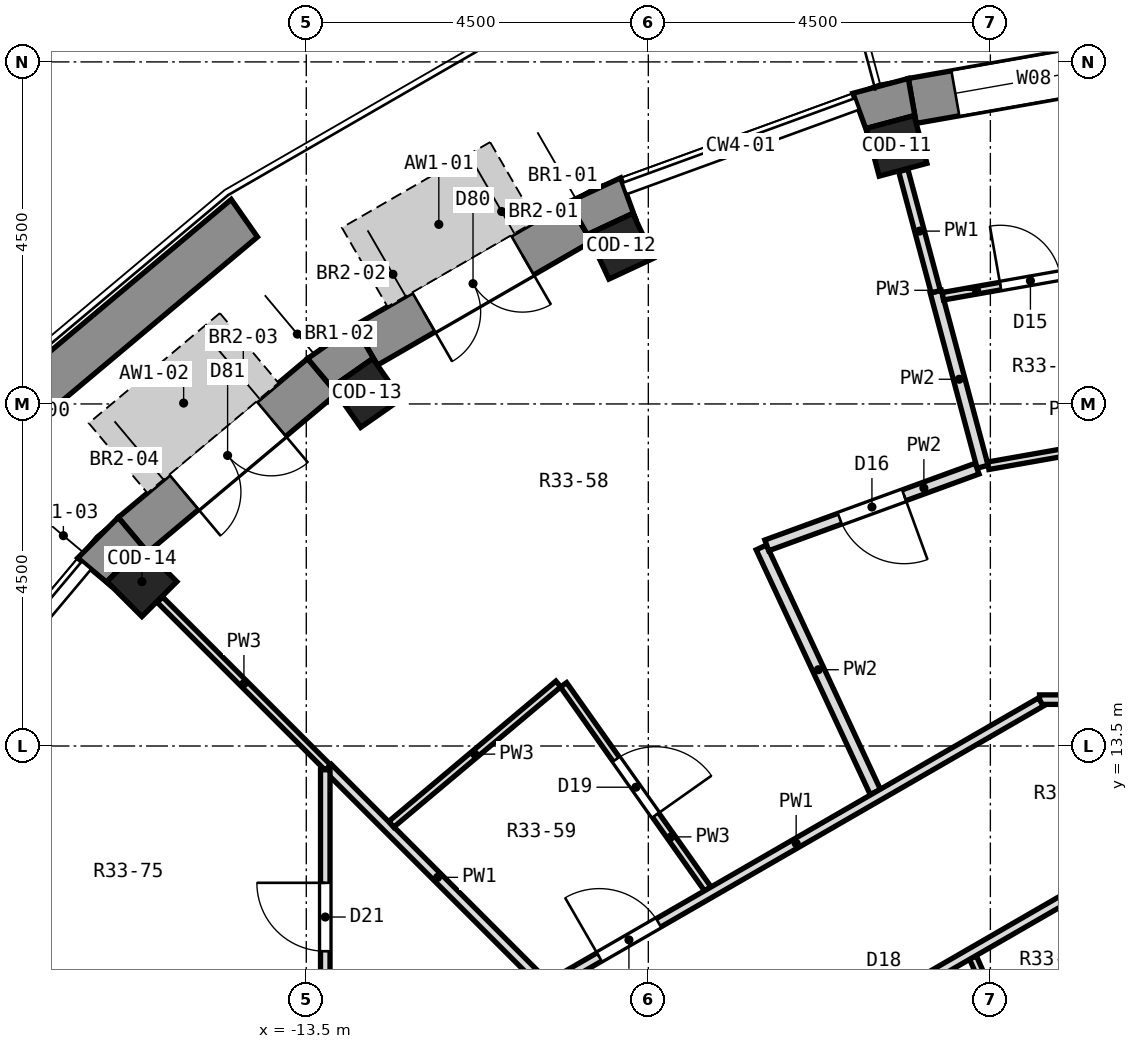
"""IFC4 building model, lengths in metres.
Left out: names, types, materials, properties, quantities, classifications, styles, units other than length and angle.
Written with IfcOpenShell. Run it as: python <this file> out.ifc"""

import sys

from ifc_helpers import new_model, si_unit, direction, frame, frame_2d, origin, origin_2d, place, context, subcontext, project, spatial, polyline, rectangle, outline, extrude, element, fill, save


model = new_model("IFC4")
c1 = context("Model", 3, precision=1e-05, world=origin(), true_north=direction((0.0, 1.0)))
c2 = subcontext(c1, "Body", "Model", "MODEL_VIEW")
j1 = project(units=[si_unit("LENGTHUNIT", "METRE"), si_unit("PLANEANGLEUNIT", "RADIAN")], contexts=[c1])
p1 = place(None, origin())
s1 = spatial("IfcSite", under=j1, at=p1, CompositionType="ELEMENT")
p2 = place(p1, origin())
s2 = spatial("IfcBuilding", under=s1, at=p2, CompositionType="ELEMENT")
p3 = place(p2, frame((0.0, 0.0, 229.7)))
s3 = spatial("IfcBuildingStorey", under=s2, at=p3, CompositionType="ELEMENT", Elevation=229.7)
for number, where, z_axis, x_axis in (
    (1, (-5.733, 21.395, 0.0), (0.0, 0.0, 1.0), (-0.259, 0.966, 0.0)),
    (2, (-9.361, 20.075, 0.0), (0.0, 0.0, 1.0), (-0.423, 0.906, 0.0)),
    (3, (-12.705, 18.144, 0.0), (0.0, 0.0, 1.0), (-0.574, 0.819, 0.0)),
    (4, (-15.662, 15.662, 0.0), (0.0, 0.0, 1.0), (-0.707, 0.707, 0.0)),
):
    element("IfcColumn", number, at=place(p3, frame(where, z_axis=z_axis, x_axis=x_axis)), inside=s3, PredefinedType="COLUMN", context=c2, shape_type="SweptSolid", body=[
        extrude(rectangle(XDim=0.65, YDim=0.65, at=origin_2d()), origin(), (0.0, 0.0, 1.0), 3.3),
    ])
p4 = place(p3, frame((-2.325, 22.551, 0.0), z_axis=(0.0, 0.0, 1.0), x_axis=(-0.984806225186, -0.173656842178, 0.0)))
e5 = element("IfcWall", 5, at=p4, inside=s3, PredefinedType="SOLIDWALL", context=c2, shape_type="SweptSolid", body=[
    extrude(rectangle(XDim=3.252, YDim=0.6, at=frame_2d((1.626, 0.0))), origin(), (0.0, 0.0, 1.0), 2.9),
])
p5 = place(p4, frame((0.576, 0.0, 0.9)))
e6 = element("IfcOpeningElement", 6, at=p5, cuts=e5, PredefinedType="OPENING", context=c2, shape_type="SweptSolid", body=[
    extrude(rectangle(XDim=2.1, YDim=1.8, at=frame_2d((1.05, 0.9))), frame((0.0, 0.312, 0.0), z_axis=(0.0, -1.0, 0.0), x_axis=(1.0, 0.0, 0.0)), (0.0, 0.0, 1.0), 0.624),
])
p6 = place(p3, frame((-9.898, 20.396, 0.0), z_axis=(0.0, 0.0, 1.0), x_axis=(-0.866016800201, -0.500014901547, 0.0)))
e7 = element("IfcWall", 7, at=p6, inside=s3, PredefinedType="SOLIDWALL", context=c2, shape_type="SweptSolid", body=[
    extrude(rectangle(XDim=3.252, YDim=0.6, at=frame_2d((1.626, 0.0))), origin(), (0.0, 0.0, 1.0), 2.9),
])
p7 = place(p6, frame((0.876, 0.0, 0.0)))
e8 = element("IfcOpeningElement", 8, at=p7, cuts=e7, PredefinedType="OPENING", context=c2, shape_type="SweptSolid", body=[
    extrude(rectangle(XDim=1.5, YDim=2.4, at=frame_2d((0.75, 1.2))), frame((0.0, 0.312, 0.0), z_axis=(0.0, -1.0, 0.0), x_axis=(1.0, 0.0, 0.0)), (0.0, 0.0, 1.0), 0.624),
])
p8 = place(p3, frame((-13.29, 18.367, 0.0), z_axis=(0.0, 0.0, 1.0), x_axis=(-0.766056773982, -0.64277291405, 0.0)))
e9 = element("IfcWall", 9, at=p8, inside=s3, PredefinedType="SOLIDWALL", context=c2, shape_type="SweptSolid", body=[
    extrude(rectangle(XDim=3.252, YDim=0.6, at=frame_2d((1.626, 0.0))), origin(), (0.0, 0.0, 1.0), 2.9),
])
p9 = place(p8, frame((0.876, 0.0, 0.0)))
e10 = element("IfcOpeningElement", 10, at=p9, cuts=e9, PredefinedType="OPENING", context=c2, shape_type="SweptSolid", body=[
    extrude(rectangle(XDim=1.5, YDim=2.4, at=frame_2d((0.75, 1.2))), frame((0.0, 0.312, 0.0), z_axis=(0.0, -1.0, 0.0), x_axis=(1.0, 0.0, 0.0)), (0.0, 0.0, 1.0), 0.624),
])
p10 = place(p3, origin())
e11 = element("IfcWall", 11, at=p10, inside=s3, PredefinedType="SOLIDWALL", context=c2, shape_type="SweptSolid", body=[
    extrude(outline(polyline([(-6.309, 22.087), (-6.104, 21.523), (-6.131, 21.625), (-5.503, 21.793), (-5.476, 21.691), (-5.58, 22.282), (-6.309, 22.087)])), origin(), (0.0, 0.0, 1.0), 2.9),
])
p11 = place(p3, origin())
e12 = element("IfcWall", 12, at=p11, inside=s3, PredefinedType="SOLIDWALL", context=c2, shape_type="SweptSolid", body=[
    extrude(outline(polyline([(-9.364, 20.975), (-10.048, 20.656), (-9.748, 20.136), (-9.793, 20.232), (-9.204, 20.507), (-9.159, 20.411), (-9.364, 20.975)])), origin(), (0.0, 0.0, 1.0), 2.9),
])
p12 = place(p3, origin())
e13 = element("IfcWall", 13, at=p12, inside=s3, PredefinedType="SOLIDWALL", context=c2, shape_type="SweptSolid", body=[
    extrude(outline(polyline([(-12.864, 19.03), (-13.482, 18.597), (-13.097, 18.137), (-13.157, 18.224), (-12.625, 18.597), (-12.564, 18.51), (-12.864, 19.03)])), origin(), (0.0, 0.0, 1.0), 2.9),
])
p13 = place(p3, origin())
e14 = element("IfcWall", 14, at=p13, inside=s3, PredefinedType="SOLIDWALL", context=c2, shape_type="SweptSolid", body=[
    extrude(outline(polyline([(-16.507, 15.973), (-16.047, 15.588), (-16.122, 15.662), (-15.662, 16.122), (-15.588, 16.047), (-15.973, 16.507), (-16.507, 15.973)])), origin(), (0.0, 0.0, 1.0), 2.9),
])
p14 = place(p3, origin())
e15 = element("IfcWall", 15, at=p14, inside=s3, PredefinedType="PARAPET", context=c2, shape_type="SweptSolid", body=[
    extrude(outline(polyline([(-14.488, 20.691), (-17.861, 17.861), (-20.691, 14.488), (-20.197, 14.142), (-17.435, 17.435), (-14.142, 20.197), (-14.488, 20.691)])), origin(), (0.0, 0.0, 1.0), 0.5),
])
p15 = place(p3, frame((-5.219, 19.477, 0.0), z_axis=(0.0, 0.0, 1.0), x_axis=(0.258503998493, -0.966010187712, 0.0)))
e16 = element("IfcWall", 16, at=p15, inside=s3, PredefinedType="PARTITIONING", context=c2, shape_type="SweptSolid", body=[
    extrude(rectangle(XDim=2.384, YDim=0.15, at=frame_2d((1.192, 0.0))), origin(), (0.0, 0.0, 1.0), 2.9),
])
p16 = place(p3, frame((-5.646, 21.072, 0.0), z_axis=(0.0, 0.0, 1.0), x_axis=(0.258849385643, -0.965917696055, 0.0)))
e17 = element("IfcWall", 17, at=p16, inside=s3, PredefinedType="PARTITIONING", context=c2, shape_type="SweptSolid", body=[
    extrude(rectangle(XDim=1.652, YDim=0.125, at=frame_2d((0.826, 0.0))), origin(), (0.0, 0.0, 1.0), 2.9),
])
p17 = place(p3, frame((-4.73, 10.719, 0.0), z_axis=(0.0, 0.0, 1.0), x_axis=(0.403695730551, -0.914893303689, 0.0)))
e18 = element("IfcWall", 18, at=p17, inside=s3, PredefinedType="PARTITIONING", context=c2, shape_type="SweptSolid", body=[
    extrude(rectangle(XDim=1.948, YDim=0.1, at=frame_2d((0.974, 0.0))), origin(), (0.0, 0.0, 1.0), 2.9),
])
p18 = place(p17, frame((0.543, 0.0, 0.0)))
e19 = element("IfcOpeningElement", 19, at=p18, cuts=e18, PredefinedType="OPENING", context=c2, shape_type="SweptSolid", body=[
    extrude(rectangle(XDim=0.8, YDim=2.1, at=frame_2d((0.4, 1.05))), frame((0.0, 0.062, 0.0), z_axis=(0.0, -1.0, 0.0), x_axis=(1.0, 0.0, 0.0)), (0.0, 0.0, 1.0), 0.124),
])
p19 = place(p3, frame((-7.513, 16.112, 0.0), z_axis=(0.0, 0.0, 1.0), x_axis=(0.42248263036, -0.906371020634, 0.0)))
e20 = element("IfcWall", 20, at=p19, inside=s3, PredefinedType="PARTITIONING", context=c2, shape_type="SweptSolid", body=[
    extrude(rectangle(XDim=3.551, YDim=0.15, at=frame_2d((1.775, 0.0))), origin(), (0.0, 0.0, 1.0), 2.9),
])
p20 = place(p3, frame((-10.116, 14.305, 0.0), z_axis=(0.0, 0.0, 1.0), x_axis=(0.577184589489, -0.816613708957, 0.0)))
e21 = element("IfcWall", 21, at=p20, inside=s3, PredefinedType="PARTITIONING", context=c2, shape_type="SweptSolid", body=[
    extrude(rectangle(XDim=3.287, YDim=0.1, at=frame_2d((1.644, 0.0))), origin(), (0.0, 0.0, 1.0), 2.9),
])
p21 = place(p20, frame((1.2, 0.0, 0.0)))
e22 = element("IfcOpeningElement", 22, at=p21, cuts=e21, PredefinedType="OPENING", context=c2, shape_type="SweptSolid", body=[
    extrude(rectangle(XDim=0.9, YDim=2.1, at=frame_2d((0.45, 1.05))), frame((0.0, 0.062, 0.0), z_axis=(0.0, -1.0, 0.0), x_axis=(1.0, 0.0, 0.0)), (0.0, 0.0, 1.0), 0.124),
])
p22 = place(p3, frame((-15.426, 15.426, 0.0), z_axis=(0.0, 0.0, 1.0), x_axis=(0.707106781187, -0.707106781187, 0.0)))
e23 = element("IfcWall", 23, at=p22, inside=s3, PredefinedType="PARTITIONING", context=c2, shape_type="SweptSolid", body=[
    extrude(rectangle(XDim=3.127, YDim=0.1, at=frame_2d((1.563, 0.0))), origin(), (0.0, 0.0, 1.0), 2.9),
])
p23 = place(p3, frame((-13.215, 13.215, 0.0), z_axis=(0.0, 0.0, 1.0), x_axis=(0.707106781187, -0.707106781187, 0.0)))
e24 = element("IfcWall", 24, at=p23, inside=s3, PredefinedType="PARTITIONING", context=c2, shape_type="SweptSolid", body=[
    extrude(rectangle(XDim=4.081, YDim=0.125, at=frame_2d((2.041, 0.0))), origin(), (0.0, 0.0, 1.0), 2.9),
])
p24 = place(p3, frame((-3.853, 14.11, 0.0), z_axis=(0.0, 0.0, 1.0), x_axis=(1.0, 0.0, 0.0)))
e25 = element("IfcWall", 25, at=p24, inside=s3, PredefinedType="PARTITIONING", context=c2, shape_type="SweptSolid", body=[
    extrude(rectangle(XDim=7.571, YDim=0.125, at=frame_2d((3.785, 0.0))), origin(), (0.0, 0.0, 1.0), 2.9),
])
p25 = place(p3, frame((-4.528, 17.187, 0.0), z_axis=(0.0, 0.0, 1.0), x_axis=(0.984788286148, 0.173758543574, 0.0)))
e26 = element("IfcWall", 26, at=p25, inside=s3, PredefinedType="PARTITIONING", context=c2, shape_type="SweptSolid", body=[
    extrude(rectangle(XDim=2.08, YDim=0.1, at=frame_2d((1.04, 0.0))), origin(), (0.0, 0.0, 1.0), 2.9),
])
p26 = place(p3, frame((-5.125, 19.417, 0.0), z_axis=(0.0, 0.0, 1.0), x_axis=(0.984757568604, 0.173932547494, 0.0)))
e27 = element("IfcWall", 27, at=p26, inside=s3, PredefinedType="PARTITIONING", context=c2, shape_type="SweptSolid", body=[
    extrude(rectangle(XDim=2.365, YDim=0.1, at=frame_2d((1.183, 0.0))), origin(), (0.0, 0.0, 1.0), 2.9),
])
p27 = place(p26, frame((0.77, 0.0, 0.0)))
e28 = element("IfcOpeningElement", 28, at=p27, cuts=e27, PredefinedType="OPENING", context=c2, shape_type="SweptSolid", body=[
    extrude(rectangle(XDim=0.8, YDim=2.1, at=frame_2d((0.4, 1.05))), frame((0.0, 0.062, 0.0), z_axis=(0.0, -1.0, 0.0), x_axis=(1.0, 0.0, 0.0)), (0.0, 0.0, 1.0), 0.124),
])
p28 = place(p3, frame((-7.442, 16.14, 0.0), z_axis=(0.0, 0.0, 1.0), x_axis=(0.939459000347, 0.342661329401, 0.0)))
e29 = element("IfcWall", 29, at=p28, inside=s3, PredefinedType="PARTITIONING", context=c2, shape_type="SweptSolid", body=[
    extrude(rectangle(XDim=2.945, YDim=0.15, at=frame_2d((1.473, 0.0))), origin(), (0.0, 0.0, 1.0), 2.9),
])
p29 = place(p28, frame((1.023, 0.0, 0.0)))
e30 = element("IfcOpeningElement", 30, at=p29, cuts=e29, PredefinedType="OPENING", context=c2, shape_type="SweptSolid", body=[
    extrude(rectangle(XDim=0.9, YDim=2.1, at=frame_2d((0.45, 1.05))), frame((0.0, 0.087, 0.0), z_axis=(0.0, -1.0, 0.0), x_axis=(1.0, 0.0, 0.0)), (0.0, 0.0, 1.0), 0.174),
])
p30 = place(p3, frame((-8.518, 8.603, 0.0), z_axis=(0.0, 0.0, 1.0), x_axis=(0.865972267571, 0.50009202333, 0.0)))
e31 = element("IfcWall", 31, at=p30, inside=s3, PredefinedType="PARTITIONING", context=c2, shape_type="SweptSolid", body=[
    extrude(rectangle(XDim=6.137, YDim=0.125, at=frame_2d((3.069, 0.0))), origin(), (0.0, 0.0, 1.0), 2.9),
])
p31 = place(p30, frame((2.524, 0.0, 0.0)))
e32 = element("IfcOpeningElement", 32, at=p31, cuts=e31, PredefinedType="OPENING", context=c2, shape_type="SweptSolid", body=[
    extrude(rectangle(XDim=1.0, YDim=2.1, at=frame_2d((0.5, 1.05))), frame((0.0, 0.074, 0.0), z_axis=(0.0, -1.0, 0.0), x_axis=(1.0, 0.0, 0.0)), (0.0, 0.0, 1.0), 0.149),
])
p32 = place(p3, frame((-10.275, 10.36, 0.0), z_axis=(0.0, 0.0, 1.0), x_axis=(0.865993671729, 0.500054957505, 0.0)))
e33 = element("IfcWall", 33, at=p32, inside=s3, PredefinedType="PARTITIONING", context=c2, shape_type="SweptSolid", body=[
    extrude(rectangle(XDim=7.436, YDim=0.125, at=frame_2d((3.718, 0.0))), origin(), (0.0, 0.0, 1.0), 2.9),
])
p33 = place(p32, frame((0.728, 0.0, 0.0)))
e34 = element("IfcOpeningElement", 34, at=p33, cuts=e33, PredefinedType="OPENING", context=c2, shape_type="SweptSolid", body=[
    extrude(rectangle(XDim=0.9, YDim=2.1, at=frame_2d((0.45, 1.05))), frame((0.0, 0.074, 0.0), z_axis=(0.0, -1.0, 0.0), x_axis=(1.0, 0.0, 0.0)), (0.0, 0.0, 1.0), 0.149),
])
p34 = place(p3, frame((-12.382, 12.47, 0.0), z_axis=(0.0, 0.0, 1.0), x_axis=(0.765817138438, 0.643058403627, 0.0)))
e35 = element("IfcWall", 35, at=p34, inside=s3, PredefinedType="PARTITIONING", context=c2, shape_type="SweptSolid", body=[
    extrude(rectangle(XDim=2.87, YDim=0.1, at=frame_2d((1.435, 0.0))), origin(), (0.0, 0.0, 1.0), 2.9),
])
p35 = place(p3, frame((-13.25, 9.25, 0.0), z_axis=(0.0, 0.0, 1.0), x_axis=(0.0, 1.0, 0.0)))
e36 = element("IfcWall", 36, at=p35, inside=s3, PredefinedType="PARTITIONING", context=c2, shape_type="SweptSolid", body=[
    extrude(rectangle(XDim=3.938, YDim=0.125, at=frame_2d((1.969, 0.0))), origin(), (0.0, 0.0, 1.0), 2.9),
])
p36 = place(p35, frame((1.55, 0.0, 0.0)))
e37 = element("IfcOpeningElement", 37, at=p36, cuts=e36, PredefinedType="OPENING", context=c2, shape_type="SweptSolid", body=[
    extrude(rectangle(XDim=0.9, YDim=2.1, at=frame_2d((0.45, 1.05))), frame((0.0, 0.074, 0.0), z_axis=(0.0, -1.0, 0.0), x_axis=(1.0, 0.0, 0.0)), (0.0, 0.0, 1.0), 0.149),
])
p37 = place(p5, origin())
e38 = element("IfcWindow", 38, at=p37, inside=s3, PartitioningType="SINGLE_PANEL", PredefinedType="WINDOW", context=c2, shape_type="SweptSolid", body=[
    extrude(rectangle(XDim=2.1, YDim=1.8, at=frame_2d((1.05, 0.9))), frame((0.0, 0.18, 0.0), z_axis=(0.0, -1.0, 0.0), x_axis=(1.0, 0.0, 0.0)), (0.0, 0.0, 1.0), 0.06),
])
fill(e6, e38)
p38 = place(p7, origin())
e39 = element("IfcDoor", 39, at=p38, inside=s3, OperationType="DOUBLE_DOOR_SINGLE_SWING", PredefinedType="DOOR", context=c2, shape_type="SweptSolid", body=[
    extrude(rectangle(XDim=1.5, YDim=2.4, at=frame_2d((0.75, 1.2))), frame((0.0, 0.125, 0.0), z_axis=(0.0, -1.0, 0.0), x_axis=(1.0, 0.0, 0.0)), (0.0, 0.0, 1.0), 0.05),
])
fill(e8, e39)
p39 = place(p9, origin())
e40 = element("IfcDoor", 40, at=p39, inside=s3, OperationType="DOUBLE_DOOR_SINGLE_SWING", PredefinedType="DOOR", context=c2, shape_type="SweptSolid", body=[
    extrude(rectangle(XDim=1.5, YDim=2.4, at=frame_2d((0.75, 1.2))), frame((0.0, 0.125, 0.0), z_axis=(0.0, -1.0, 0.0), x_axis=(1.0, 0.0, 0.0)), (0.0, 0.0, 1.0), 0.05),
])
fill(e10, e40)
p40 = place(p27, origin())
e41 = element("IfcDoor", 41, at=p40, inside=s3, OperationType="SINGLE_SWING_LEFT", PredefinedType="DOOR", context=c2, shape_type="SweptSolid", body=[
    extrude(rectangle(XDim=0.8, YDim=2.1, at=frame_2d((0.4, 1.05))), frame((0.0, 0.025, 0.0), z_axis=(0.0, -1.0, 0.0), x_axis=(1.0, 0.0, 0.0)), (0.0, 0.0, 1.0), 0.05),
])
fill(e28, e41)
p41 = place(p29, frame((0.9, 0.0, 0.0), z_axis=(0.0, 0.0, 1.0), x_axis=(-1.0, 0.0, 0.0)))
e42 = element("IfcDoor", 42, at=p41, inside=s3, OperationType="SINGLE_SWING_LEFT", PredefinedType="DOOR", context=c2, shape_type="SweptSolid", body=[
    extrude(rectangle(XDim=0.9, YDim=2.1, at=frame_2d((0.45, 1.05))), frame((0.0, 0.025, 0.0), z_axis=(0.0, -1.0, 0.0), x_axis=(1.0, 0.0, 0.0)), (0.0, 0.0, 1.0), 0.05),
])
fill(e30, e42)
p42 = place(p21, origin())
e43 = element("IfcDoor", 43, at=p42, inside=s3, OperationType="SINGLE_SWING_RIGHT", PredefinedType="DOOR", context=c2, shape_type="SweptSolid", body=[
    extrude(rectangle(XDim=0.9, YDim=2.1, at=frame_2d((0.45, 1.05))), frame((0.0, 0.025, 0.0), z_axis=(0.0, -1.0, 0.0), x_axis=(1.0, 0.0, 0.0)), (0.0, 0.0, 1.0), 0.05),
])
fill(e22, e43)
p43 = place(p33, origin())
e44 = element("IfcDoor", 44, at=p43, inside=s3, OperationType="SINGLE_SWING_LEFT", PredefinedType="DOOR", context=c2, shape_type="SweptSolid", body=[
    extrude(rectangle(XDim=0.9, YDim=2.1, at=frame_2d((0.45, 1.05))), frame((0.0, 0.025, 0.0), z_axis=(0.0, -1.0, 0.0), x_axis=(1.0, 0.0, 0.0)), (0.0, 0.0, 1.0), 0.05),
])
fill(e34, e44)
p44 = place(p36, origin())
e45 = element("IfcDoor", 45, at=p44, inside=s3, OperationType="SINGLE_SWING_RIGHT", PredefinedType="DOOR", context=c2, shape_type="SweptSolid", body=[
    extrude(rectangle(XDim=0.9, YDim=2.1, at=frame_2d((0.45, 1.05))), frame((0.0, 0.025, 0.0), z_axis=(0.0, -1.0, 0.0), x_axis=(1.0, 0.0, 0.0)), (0.0, 0.0, 1.0), 0.05),
])
fill(e37, e45)
save(model, sys.argv[1])
